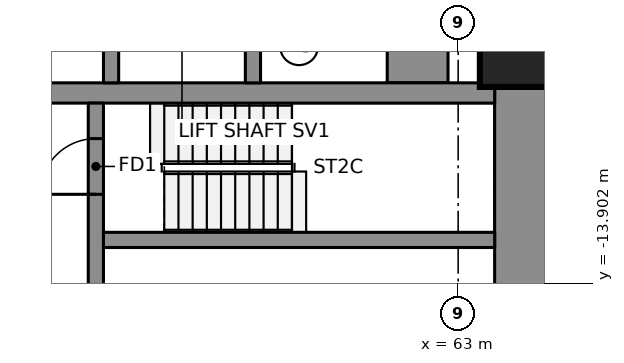
"""IFC4 building model, lengths in metres.
Left out: names, types, materials, properties, quantities, classifications, styles, units other than length and angle.
Written with IfcOpenShell. Run it as: python <this file> out.ifc"""

import sys

from ifc_helpers import new_model, si_unit, direction, frame, frame_2d, origin, origin_2d, place, context, subcontext, project, spatial, rectangle, extrude, element, fill, save


model = new_model("IFC4")
c1 = context("Model", 3, precision=1e-05, world=origin(), true_north=direction((0.0, 1.0)))
c2 = subcontext(c1, "Body", "Model", "MODEL_VIEW")
j1 = project(units=[si_unit("LENGTHUNIT", "METRE"), si_unit("PLANEANGLEUNIT", "RADIAN")], contexts=[c1])
p1 = place(None, origin())
s1 = spatial("IfcSite", under=j1, at=p1, CompositionType="ELEMENT")
p2 = place(p1, origin())
s2 = spatial("IfcBuilding", under=s1, at=p2, CompositionType="ELEMENT")
p3 = place(p2, frame((0.0, 0.0, 68.0)))
s3 = spatial("IfcBuildingStorey", under=s2, at=p3, CompositionType="ELEMENT", Elevation=68.0)
p4 = place(p3, frame((64.32, -15.75, 0.0), z_axis=(0.0, 0.0, 1.0), x_axis=(0.0, 1.0, 0.0)))
e1 = element("IfcWall", 1, at=p4, inside=s3, PredefinedType="SHEAR", context=c2, shape_type="SweptSolid", body=[
    extrude(rectangle(XDim=5.8, YDim=1.2, at=frame_2d((2.9, 0.0))), origin(), (0.0, 0.0, 1.0), 3.55),
])
p5 = place(p3, frame((62.2, -9.95, 0.0), z_axis=(0.0, 0.0, 1.0), x_axis=(0.0, 1.0, 0.0)))
e2 = element("IfcWall", 2, at=p5, inside=s3, PredefinedType="SHEAR", context=c2, shape_type="SweptSolid", body=[
    extrude(rectangle(XDim=19.9, YDim=1.2, at=frame_2d((9.95, 0.0))), origin(), (0.0, 0.0, 1.0), 3.55),
])
p6 = place(p3, frame((50.7, -10.15, 0.0), z_axis=(0.0, 0.0, 1.0), x_axis=(1.0, 0.0, 0.0)))
e3 = element("IfcWall", 3, at=p6, inside=s3, PredefinedType="SHEAR", context=c2, shape_type="SweptSolid", body=[
    extrude(rectangle(XDim=13.02, YDim=0.4, at=frame_2d((6.51, 0.0))), origin(), (0.0, 0.0, 1.0), 3.55),
])
for number, where, z_axis, x_axis in (
    (4, (56.15, -9.95, 0.0), (0.0, 0.0, 1.0), (0.0, 1.0, 0.0)),
    (5, (58.95, -9.95, 0.0), (0.0, 0.0, 1.0), (0.0, 1.0, 0.0)),
):
    element("IfcWall", number, at=place(p3, frame(where, z_axis=z_axis, x_axis=x_axis)), inside=s3, PredefinedType="SHEAR", context=c2, shape_type="SweptSolid", body=[
        extrude(rectangle(XDim=3.0, YDim=0.3, at=frame_2d((1.5, 0.0))), origin(), (0.0, 0.0, 1.0), 3.55),
    ])
p7 = place(p3, frame((55.85, -15.75, 0.0), z_axis=(0.0, 0.0, 1.0), x_axis=(0.0, 1.0, 0.0)))
e6 = element("IfcWall", 6, at=p7, inside=s3, PredefinedType="SHEAR", context=c2, shape_type="SweptSolid", body=[
    extrude(rectangle(XDim=5.4, YDim=0.3, at=frame_2d((2.7, 0.0))), origin(), (0.0, 0.0, 1.0), 3.55),
])
p8 = place(p7, frame((3.6, 0.0, 0.0)))
e7 = element("IfcOpeningElement", 7, at=p8, cuts=e6, PredefinedType="OPENING", context=c2, shape_type="SweptSolid", body=[
    extrude(rectangle(XDim=1.1, YDim=2.1, at=frame_2d((0.55, 1.05))), frame((0.0, 0.16, 0.0), z_axis=(0.0, -1.0, 0.0), x_axis=(1.0, 0.0, 0.0)), (0.0, 0.0, 1.0), 0.32),
])
p9 = place(p7, frame((0.8, 0.0, 0.0)))
e8 = element("IfcOpeningElement", 8, at=p9, cuts=e6, PredefinedType="OPENING", context=c2, shape_type="SweptSolid", body=[
    extrude(rectangle(XDim=0.9, YDim=2.1, at=frame_2d((0.45, 1.05))), frame((0.0, 0.16, 0.0), z_axis=(0.0, -1.0, 0.0), x_axis=(1.0, 0.0, 0.0)), (0.0, 0.0, 1.0), 0.32),
])
p10 = place(p3, frame((56.0, -13.05, 0.0), z_axis=(0.0, 0.0, 1.0), x_axis=(1.0, 0.0, 0.0)))
e9 = element("IfcWall", 9, at=p10, inside=s3, PredefinedType="SHEAR", context=c2, shape_type="SweptSolid", body=[
    extrude(rectangle(XDim=7.72, YDim=0.3, at=frame_2d((3.86, 0.0))), origin(), (0.0, 0.0, 1.0), 3.55),
])
p11 = place(p3, frame((64.328, -9.131, 0.0), z_axis=(0.0, 0.0, 1.0), x_axis=(1.0, 0.0, 0.0)))
e10 = element("IfcColumn", 10, at=p11, inside=s3, PredefinedType="COLUMN", context=c2, shape_type="SweptSolid", body=[
    extrude(rectangle(XDim=1.8, YDim=1.8, at=origin_2d()), origin(), (0.0, 0.0, 1.0), 3.55),
])
p12 = place(p8, origin())
e11 = element("IfcDoor", 11, at=p12, inside=s3, OperationType="SINGLE_SWING_RIGHT", PredefinedType="DOOR", context=c2, shape_type="SweptSolid", body=[
    extrude(rectangle(XDim=1.1, YDim=2.1, at=frame_2d((0.55, 1.05))), frame((0.0, 0.025, 0.0), z_axis=(0.0, -1.0, 0.0), x_axis=(1.0, 0.0, 0.0)), (0.0, 0.0, 1.0), 0.05),
])
fill(e7, e11)
save(model, sys.argv[1])
